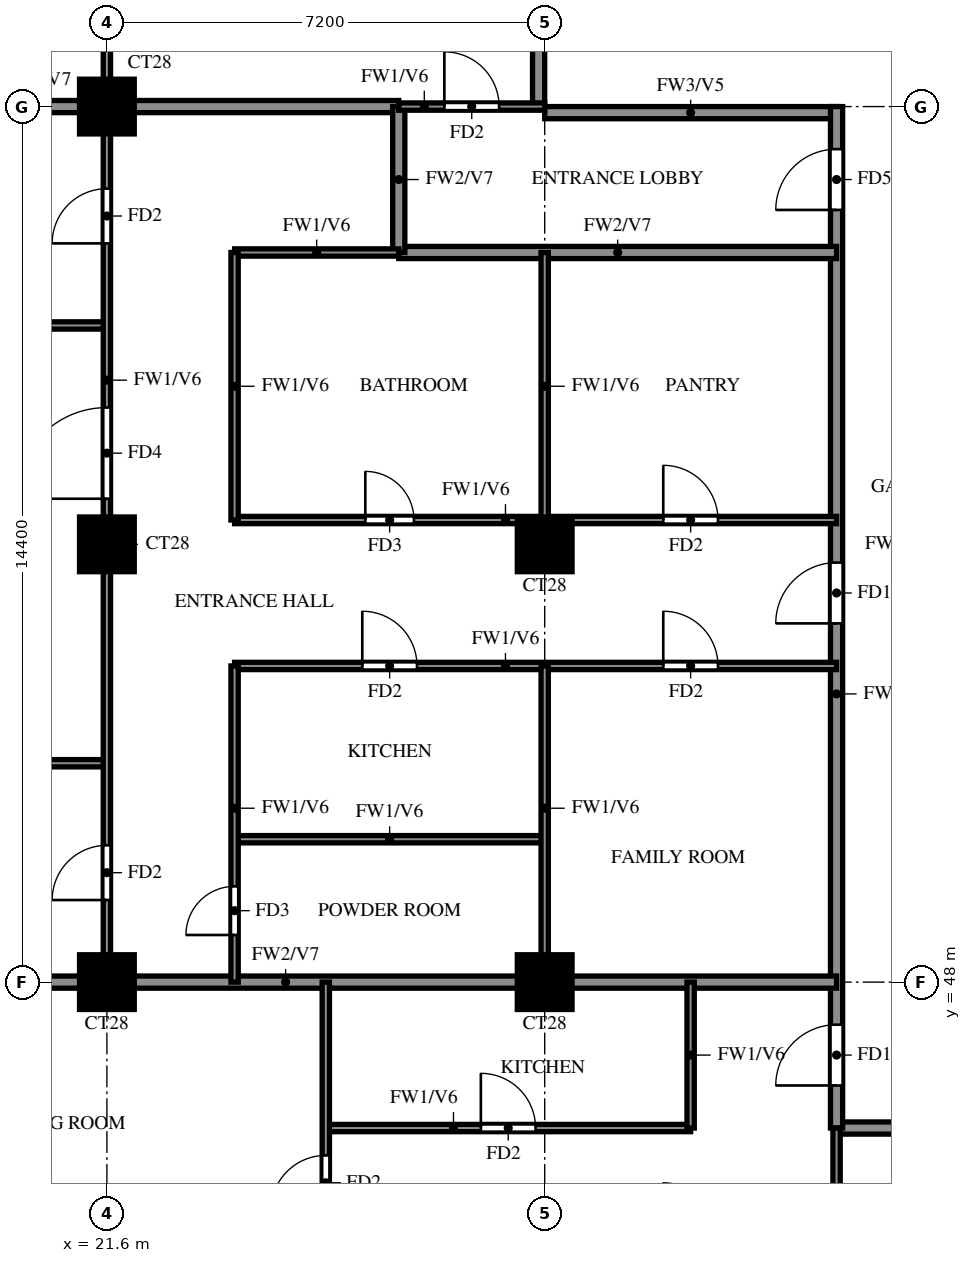
"""IFC4 building model, lengths in metres.
Left out: names, types, materials, properties, quantities, classifications, styles, units other than length and angle.
Written with IfcOpenShell. Run it as: python <this file> out.ifc"""

import sys

from ifc_helpers import new_model, si_unit, direction, frame, frame_2d, origin, origin_2d, place, context, subcontext, project, spatial, rectangle, extrude, source, transform, mapped, element, fill, save


model = new_model("IFC4")
c1 = context("Model", 3, precision=1e-05, world=origin(), true_north=direction((0.0, 1.0)))
c2 = subcontext(c1, "Body", "Model", "MODEL_VIEW")
j1 = project(units=[si_unit("LENGTHUNIT", "METRE"), si_unit("PLANEANGLEUNIT", "RADIAN")], contexts=[c1])
p1 = place(None, origin())
s1 = spatial("IfcSite", under=j1, at=p1, CompositionType="ELEMENT")
p2 = place(p1, origin())
s2 = spatial("IfcBuilding", under=s1, at=p2, CompositionType="ELEMENT")
p3 = place(p2, frame((0.0, 0.0, 202.5)))
s3 = spatial("IfcBuildingStorey", under=s2, at=p3, CompositionType="ELEMENT", Elevation=202.5)
m1 = source(origin(), c2, "Body", "SweptSolid", [
    extrude(rectangle(XDim=0.9, YDim=0.9, at=origin_2d()), origin(), (0.0, 0.0, 1.0), 3.1),
])
for number, where, z_axis, x_axis in (
    (1, (21.6, 48.0, 0.0), (0.0, 0.0, 1.0), (1.0, 0.0, 0.0)),
    (2, (28.8, 48.0, 0.0), (0.0, 0.0, 1.0), (1.0, 0.0, 0.0)),
    (3, (21.6, 55.2, 0.0), (0.0, 0.0, 1.0), (1.0, 0.0, 0.0)),
    (4, (28.8, 55.2, 0.0), (0.0, 0.0, 1.0), (1.0, 0.0, 0.0)),
    (5, (21.6, 62.4, 0.0), (0.0, 0.0, 1.0), (1.0, 0.0, 0.0)),
):
    element("IfcColumn", number, at=place(p3, frame(where, z_axis=z_axis, x_axis=x_axis)), inside=s3, PredefinedType="COLUMN", context=c2, shape_type="MappedRepresentation", body=[
        mapped(m1, transform((0.0, 0.0, 0.0))),
    ])
p4 = place(p3, frame((33.6, 45.6, 0.0), z_axis=(0.0, 0.0, 1.0), x_axis=(1.0, 0.0, 0.0)))
e6 = element("IfcWall", 6, at=p4, inside=s3, PredefinedType="SOLIDWALL", context=c2, shape_type="SweptSolid", body=[
    extrude(rectangle(XDim=7.2, YDim=0.2, at=frame_2d((3.6, 0.0))), origin(), (0.0, 0.0, 1.0), 3.1),
])
p5 = place(p4, frame((3.15, 0.0, 0.0)))
e7 = element("IfcOpeningElement", 7, at=p5, cuts=e6, PredefinedType="OPENING", context=c2, shape_type="SweptSolid", body=[
    extrude(rectangle(XDim=0.9, YDim=2.1, at=frame_2d((0.45, 1.05))), frame((0.0, 0.11, 0.0), z_axis=(0.0, -1.0, 0.0), x_axis=(1.0, 0.0, 0.0)), (0.0, 0.0, 1.0), 0.22),
])
p6 = place(p3, frame((28.8, 62.3, 0.0), z_axis=(0.0, 0.0, 1.0), x_axis=(1.0, 0.0, 0.0)))
e8 = element("IfcWall", 8, at=p6, inside=s3, PredefinedType="SOLIDWALL", context=c2, shape_type="SweptSolid", body=[
    extrude(rectangle(XDim=4.8, YDim=0.2, at=frame_2d((2.4, 0.0))), origin(), (0.0, 0.0, 1.0), 3.1),
])
p7 = place(p3, frame((28.7, 62.4, 0.0), z_axis=(0.0, 0.0, 1.0), x_axis=(0.0, 1.0, 0.0)))
e9 = element("IfcWall", 9, at=p7, inside=s3, PredefinedType="SOLIDWALL", context=c2, shape_type="SweptSolid", body=[
    extrude(rectangle(XDim=15.6, YDim=0.2, at=frame_2d((7.8, 0.0))), origin(), (0.0, 0.0, 1.0), 3.1),
])
p8 = place(p3, frame((33.6, 45.6, 0.0), z_axis=(0.0, 0.0, 1.0), x_axis=(0.0, 1.0, 0.0)))
e10 = element("IfcWall", 10, at=p8, inside=s3, PredefinedType="SOLIDWALL", context=c2, shape_type="SweptSolid", body=[
    extrude(rectangle(XDim=16.8, YDim=0.2, at=frame_2d((8.4, 0.0))), origin(), (0.0, 0.0, 1.0), 3.1),
])
p9 = place(p8, frame((0.7, 0.0, 0.0)))
e11 = element("IfcOpeningElement", 11, at=p9, cuts=e10, PredefinedType="OPENING", context=c2, shape_type="SweptSolid", body=[
    extrude(rectangle(XDim=1.0, YDim=2.1, at=frame_2d((0.5, 1.05))), frame((0.0, 0.11, 0.0), z_axis=(0.0, -1.0, 0.0), x_axis=(1.0, 0.0, 0.0)), (0.0, 0.0, 1.0), 0.22),
])
p10 = place(p8, frame((8.3, 0.0, 0.0)))
e12 = element("IfcOpeningElement", 12, at=p10, cuts=e10, PredefinedType="OPENING", context=c2, shape_type="SweptSolid", body=[
    extrude(rectangle(XDim=1.0, YDim=2.1, at=frame_2d((0.5, 1.05))), frame((0.0, 0.11, 0.0), z_axis=(0.0, -1.0, 0.0), x_axis=(1.0, 0.0, 0.0)), (0.0, 0.0, 1.0), 0.22),
])
p11 = place(p8, frame((15.1, 0.0, 0.0)))
e13 = element("IfcOpeningElement", 13, at=p11, cuts=e10, PredefinedType="OPENING", context=c2, shape_type="SweptSolid", body=[
    extrude(rectangle(XDim=1.0, YDim=2.1, at=frame_2d((0.5, 1.05))), frame((0.0, 0.11, 0.0), z_axis=(0.0, -1.0, 0.0), x_axis=(1.0, 0.0, 0.0)), (0.0, 0.0, 1.0), 0.22),
])
p12 = place(p3, frame((14.525, 48.0, 0.0), z_axis=(0.0, 0.0, 1.0), x_axis=(1.0, 0.0, 0.0)))
e14 = element("IfcWall", 14, at=p12, inside=s3, PredefinedType="SOLIDWALL", context=c2, shape_type="SweptSolid", body=[
    extrude(rectangle(XDim=19.075, YDim=0.2, at=frame_2d((9.538, 0.0))), origin(), (0.0, 0.0, 1.0), 3.1),
])
p13 = place(p3, frame((26.4, 60.0, 0.0), z_axis=(0.0, 0.0, 1.0), x_axis=(1.0, 0.0, 0.0)))
e15 = element("IfcWall", 15, at=p13, inside=s3, PredefinedType="SOLIDWALL", context=c2, shape_type="SweptSolid", body=[
    extrude(rectangle(XDim=7.2, YDim=0.2, at=frame_2d((3.6, 0.0))), origin(), (0.0, 0.0, 1.0), 3.1),
])
p14 = place(p3, frame((14.525, 62.4, 0.0), z_axis=(0.0, 0.0, 1.0), x_axis=(1.0, 0.0, 0.0)))
e16 = element("IfcWall", 16, at=p14, inside=s3, PredefinedType="SOLIDWALL", context=c2, shape_type="SweptSolid", body=[
    extrude(rectangle(XDim=11.875, YDim=0.2, at=frame_2d((5.938, 0.0))), origin(), (0.0, 0.0, 1.0), 3.1),
])
p15 = place(p3, frame((26.4, 60.0, 0.0), z_axis=(0.0, 0.0, 1.0), x_axis=(0.0, 1.0, 0.0)))
e17 = element("IfcWall", 17, at=p15, inside=s3, PredefinedType="SOLIDWALL", context=c2, shape_type="SweptSolid", body=[
    extrude(rectangle(XDim=2.4, YDim=0.2, at=frame_2d((1.2, 0.0))), origin(), (0.0, 0.0, 1.0), 3.1),
])
p16 = place(p3, frame((25.2, 45.6, 0.0), z_axis=(0.0, 0.0, 1.0), x_axis=(1.0, 0.0, 0.0)))
e18 = element("IfcWall", 18, at=p16, inside=s3, PredefinedType="PARTITIONING", context=c2, shape_type="SweptSolid", body=[
    extrude(rectangle(XDim=6.0, YDim=0.12, at=frame_2d((3.0, 0.0))), origin(), (0.0, 0.0, 1.0), 3.1),
])
p17 = place(p16, frame((2.55, 0.0, 0.0)))
e19 = element("IfcOpeningElement", 19, at=p17, cuts=e18, PredefinedType="OPENING", context=c2, shape_type="SweptSolid", body=[
    extrude(rectangle(XDim=0.9, YDim=2.1, at=frame_2d((0.45, 1.05))), frame((0.0, 0.07, 0.0), z_axis=(0.0, -1.0, 0.0), x_axis=(1.0, 0.0, 0.0)), (0.0, 0.0, 1.0), 0.14),
])
p18 = place(p3, frame((23.7, 50.35, 0.0), z_axis=(0.0, 0.0, 1.0), x_axis=(1.0, 0.0, 0.0)))
e20 = element("IfcWall", 20, at=p18, inside=s3, PredefinedType="PARTITIONING", context=c2, shape_type="SweptSolid", body=[
    extrude(rectangle(XDim=5.1, YDim=0.12, at=frame_2d((2.55, 0.0))), origin(), (0.0, 0.0, 1.0), 3.1),
])
p19 = place(p3, frame((14.525, 51.6, 0.0), z_axis=(0.0, 0.0, 1.0), x_axis=(1.0, 0.0, 0.0)))
e21 = element("IfcWall", 21, at=p19, inside=s3, PredefinedType="PARTITIONING", context=c2, shape_type="SweptSolid", body=[
    extrude(rectangle(XDim=7.075, YDim=0.12, at=frame_2d((3.538, 0.0))), origin(), (0.0, 0.0, 1.0), 3.1),
])
p20 = place(p3, frame((23.7, 53.2, 0.0), z_axis=(0.0, 0.0, 1.0), x_axis=(1.0, 0.0, 0.0)))
e22 = element("IfcWall", 22, at=p20, inside=s3, PredefinedType="PARTITIONING", context=c2, shape_type="SweptSolid", body=[
    extrude(rectangle(XDim=9.9, YDim=0.12, at=frame_2d((4.95, 0.0))), origin(), (0.0, 0.0, 1.0), 3.1),
])
p21 = place(p20, frame((2.1, 0.0, 0.0)))
e23 = element("IfcOpeningElement", 23, at=p21, cuts=e22, PredefinedType="OPENING", context=c2, shape_type="SweptSolid", body=[
    extrude(rectangle(XDim=0.9, YDim=2.1, at=frame_2d((0.45, 1.05))), frame((0.0, 0.07, 0.0), z_axis=(0.0, -1.0, 0.0), x_axis=(1.0, 0.0, 0.0)), (0.0, 0.0, 1.0), 0.14),
])
p22 = place(p20, frame((7.05, 0.0, 0.0)))
e24 = element("IfcOpeningElement", 24, at=p22, cuts=e22, PredefinedType="OPENING", context=c2, shape_type="SweptSolid", body=[
    extrude(rectangle(XDim=0.9, YDim=2.1, at=frame_2d((0.45, 1.05))), frame((0.0, 0.07, 0.0), z_axis=(0.0, -1.0, 0.0), x_axis=(1.0, 0.0, 0.0)), (0.0, 0.0, 1.0), 0.14),
])
p23 = place(p3, frame((23.7, 55.6, 0.0), z_axis=(0.0, 0.0, 1.0), x_axis=(1.0, 0.0, 0.0)))
e25 = element("IfcWall", 25, at=p23, inside=s3, PredefinedType="PARTITIONING", context=c2, shape_type="SweptSolid", body=[
    extrude(rectangle(XDim=9.9, YDim=0.12, at=frame_2d((4.95, 0.0))), origin(), (0.0, 0.0, 1.0), 3.1),
])
p24 = place(p23, frame((2.15, 0.0, 0.0)))
e26 = element("IfcOpeningElement", 26, at=p24, cuts=e25, PredefinedType="OPENING", context=c2, shape_type="SweptSolid", body=[
    extrude(rectangle(XDim=0.8, YDim=2.1, at=frame_2d((0.4, 1.05))), frame((0.0, 0.07, 0.0), z_axis=(0.0, -1.0, 0.0), x_axis=(1.0, 0.0, 0.0)), (0.0, 0.0, 1.0), 0.14),
])
p25 = place(p23, frame((7.05, 0.0, 0.0)))
e27 = element("IfcOpeningElement", 27, at=p25, cuts=e25, PredefinedType="OPENING", context=c2, shape_type="SweptSolid", body=[
    extrude(rectangle(XDim=0.9, YDim=2.1, at=frame_2d((0.45, 1.05))), frame((0.0, 0.07, 0.0), z_axis=(0.0, -1.0, 0.0), x_axis=(1.0, 0.0, 0.0)), (0.0, 0.0, 1.0), 0.14),
])
p26 = place(p3, frame((14.525, 58.8, 0.0), z_axis=(0.0, 0.0, 1.0), x_axis=(1.0, 0.0, 0.0)))
e28 = element("IfcWall", 28, at=p26, inside=s3, PredefinedType="PARTITIONING", context=c2, shape_type="SweptSolid", body=[
    extrude(rectangle(XDim=7.075, YDim=0.12, at=frame_2d((3.538, 0.0))), origin(), (0.0, 0.0, 1.0), 3.1),
])
p27 = place(p3, frame((23.7, 60.0, 0.0), z_axis=(0.0, 0.0, 1.0), x_axis=(1.0, 0.0, 0.0)))
e29 = element("IfcWall", 29, at=p27, inside=s3, PredefinedType="PARTITIONING", context=c2, shape_type="SweptSolid", body=[
    extrude(rectangle(XDim=2.7, YDim=0.12, at=frame_2d((1.35, 0.0))), origin(), (0.0, 0.0, 1.0), 3.1),
])
p28 = place(p3, frame((26.4, 62.4, 0.0), z_axis=(0.0, 0.0, 1.0), x_axis=(1.0, 0.0, 0.0)))
e30 = element("IfcWall", 30, at=p28, inside=s3, PredefinedType="PARTITIONING", context=c2, shape_type="SweptSolid", body=[
    extrude(rectangle(XDim=2.4, YDim=0.12, at=frame_2d((1.2, 0.0))), origin(), (0.0, 0.0, 1.0), 3.1),
])
p29 = place(p28, frame((0.75, 0.0, 0.0)))
e31 = element("IfcOpeningElement", 31, at=p29, cuts=e30, PredefinedType="OPENING", context=c2, shape_type="SweptSolid", body=[
    extrude(rectangle(XDim=0.9, YDim=2.1, at=frame_2d((0.45, 1.05))), frame((0.0, 0.07, 0.0), z_axis=(0.0, -1.0, 0.0), x_axis=(1.0, 0.0, 0.0)), (0.0, 0.0, 1.0), 0.14),
])
p30 = place(p3, frame((21.6, 48.0, 0.0), z_axis=(0.0, 0.0, 1.0), x_axis=(0.0, 1.0, 0.0)))
e32 = element("IfcWall", 32, at=p30, inside=s3, PredefinedType="PARTITIONING", context=c2, shape_type="SweptSolid", body=[
    extrude(rectangle(XDim=18.0, YDim=0.12, at=frame_2d((9.0, 0.0))), origin(), (0.0, 0.0, 1.0), 3.1),
])
p31 = place(p30, frame((1.35, 0.0, 0.0)))
e33 = element("IfcOpeningElement", 33, at=p31, cuts=e32, PredefinedType="OPENING", context=c2, shape_type="SweptSolid", body=[
    extrude(rectangle(XDim=0.9, YDim=2.1, at=frame_2d((0.45, 1.05))), frame((0.0, 0.07, 0.0), z_axis=(0.0, -1.0, 0.0), x_axis=(1.0, 0.0, 0.0)), (0.0, 0.0, 1.0), 0.14),
])
p32 = place(p30, frame((7.95, 0.0, 0.0)))
e34 = element("IfcOpeningElement", 34, at=p32, cuts=e32, PredefinedType="OPENING", context=c2, shape_type="SweptSolid", body=[
    extrude(rectangle(XDim=1.5, YDim=2.1, at=frame_2d((0.75, 1.05))), frame((0.0, 0.07, 0.0), z_axis=(0.0, -1.0, 0.0), x_axis=(1.0, 0.0, 0.0)), (0.0, 0.0, 1.0), 0.14),
])
p33 = place(p30, frame((12.15, 0.0, 0.0)))
e35 = element("IfcOpeningElement", 35, at=p33, cuts=e32, PredefinedType="OPENING", context=c2, shape_type="SweptSolid", body=[
    extrude(rectangle(XDim=0.9, YDim=2.1, at=frame_2d((0.45, 1.05))), frame((0.0, 0.07, 0.0), z_axis=(0.0, -1.0, 0.0), x_axis=(1.0, 0.0, 0.0)), (0.0, 0.0, 1.0), 0.14),
])
p34 = place(p30, frame((15.75, 0.0, 0.0)))
e36 = element("IfcOpeningElement", 36, at=p34, cuts=e32, PredefinedType="OPENING", context=c2, shape_type="SweptSolid", body=[
    extrude(rectangle(XDim=0.9, YDim=2.1, at=frame_2d((0.45, 1.05))), frame((0.0, 0.07, 0.0), z_axis=(0.0, -1.0, 0.0), x_axis=(1.0, 0.0, 0.0)), (0.0, 0.0, 1.0), 0.14),
])
p35 = place(p3, frame((23.7, 48.0, 0.0), z_axis=(0.0, 0.0, 1.0), x_axis=(0.0, 1.0, 0.0)))
e37 = element("IfcWall", 37, at=p35, inside=s3, PredefinedType="PARTITIONING", context=c2, shape_type="SweptSolid", body=[
    extrude(rectangle(XDim=5.2, YDim=0.12, at=frame_2d((2.6, 0.0))), origin(), (0.0, 0.0, 1.0), 3.1),
])
p36 = place(p35, frame((0.775, 0.0, 0.0)))
e38 = element("IfcOpeningElement", 38, at=p36, cuts=e37, PredefinedType="OPENING", context=c2, shape_type="SweptSolid", body=[
    extrude(rectangle(XDim=0.8, YDim=2.1, at=frame_2d((0.4, 1.05))), frame((0.0, 0.07, 0.0), z_axis=(0.0, -1.0, 0.0), x_axis=(1.0, 0.0, 0.0)), (0.0, 0.0, 1.0), 0.14),
])
p37 = place(p3, frame((23.7, 55.6, 0.0), z_axis=(0.0, 0.0, 1.0), x_axis=(0.0, 1.0, 0.0)))
e39 = element("IfcWall", 39, at=p37, inside=s3, PredefinedType="PARTITIONING", context=c2, shape_type="SweptSolid", body=[
    extrude(rectangle(XDim=4.4, YDim=0.12, at=frame_2d((2.2, 0.0))), origin(), (0.0, 0.0, 1.0), 3.1),
])
p38 = place(p3, frame((25.2, 39.725, 0.0), z_axis=(0.0, 0.0, 1.0), x_axis=(0.0, 1.0, 0.0)))
e40 = element("IfcWall", 40, at=p38, inside=s3, PredefinedType="PARTITIONING", context=c2, shape_type="SweptSolid", body=[
    extrude(rectangle(XDim=8.275, YDim=0.12, at=frame_2d((4.137, 0.0))), origin(), (0.0, 0.0, 1.0), 3.1),
])
p39 = place(p38, frame((4.525, 0.0, 0.0)))
e41 = element("IfcOpeningElement", 41, at=p39, cuts=e40, PredefinedType="OPENING", context=c2, shape_type="SweptSolid", body=[
    extrude(rectangle(XDim=0.9, YDim=2.1, at=frame_2d((0.45, 1.05))), frame((0.0, 0.07, 0.0), z_axis=(0.0, -1.0, 0.0), x_axis=(1.0, 0.0, 0.0)), (0.0, 0.0, 1.0), 0.14),
])
p40 = place(p3, frame((28.8, 48.0, 0.0), z_axis=(0.0, 0.0, 1.0), x_axis=(0.0, 1.0, 0.0)))
e42 = element("IfcWall", 42, at=p40, inside=s3, PredefinedType="PARTITIONING", context=c2, shape_type="SweptSolid", body=[
    extrude(rectangle(XDim=5.2, YDim=0.12, at=frame_2d((2.6, 0.0))), origin(), (0.0, 0.0, 1.0), 3.1),
])
p41 = place(p3, frame((28.8, 55.6, 0.0), z_axis=(0.0, 0.0, 1.0), x_axis=(0.0, 1.0, 0.0)))
e43 = element("IfcWall", 43, at=p41, inside=s3, PredefinedType="PARTITIONING", context=c2, shape_type="SweptSolid", body=[
    extrude(rectangle(XDim=4.4, YDim=0.12, at=frame_2d((2.2, 0.0))), origin(), (0.0, 0.0, 1.0), 3.1),
])
p42 = place(p3, frame((31.2, 45.6, 0.0), z_axis=(0.0, 0.0, 1.0), x_axis=(0.0, 1.0, 0.0)))
e44 = element("IfcWall", 44, at=p42, inside=s3, PredefinedType="PARTITIONING", context=c2, shape_type="SweptSolid", body=[
    extrude(rectangle(XDim=2.4, YDim=0.12, at=frame_2d((1.2, 0.0))), origin(), (0.0, 0.0, 1.0), 3.1),
])
p43 = place(p3, frame((33.6, 39.725, 0.0), z_axis=(0.0, 0.0, 1.0), x_axis=(0.0, 1.0, 0.0)))
e45 = element("IfcWall", 45, at=p43, inside=s3, PredefinedType="PARTITIONING", context=c2, shape_type="SweptSolid", body=[
    extrude(rectangle(XDim=5.875, YDim=0.12, at=frame_2d((2.938, 0.0))), origin(), (0.0, 0.0, 1.0), 3.1),
])
p44 = place(p9, origin())
e46 = element("IfcDoor", 46, at=p44, inside=s3, OperationType="SINGLE_SWING_RIGHT", PredefinedType="DOOR", context=c2, shape_type="SweptSolid", body=[
    extrude(rectangle(XDim=1.0, YDim=2.1, at=frame_2d((0.5, 1.05))), frame((0.0, 0.025, 0.0), z_axis=(0.0, -1.0, 0.0), x_axis=(1.0, 0.0, 0.0)), (0.0, 0.0, 1.0), 0.05),
])
fill(e11, e46)
p45 = place(p39, origin())
e47 = element("IfcDoor", 47, at=p45, inside=s3, OperationType="SINGLE_SWING_LEFT", PredefinedType="DOOR", context=c2, shape_type="SweptSolid", body=[
    extrude(rectangle(XDim=0.9, YDim=2.1, at=frame_2d((0.45, 1.05))), frame((0.0, 0.025, 0.0), z_axis=(0.0, -1.0, 0.0), x_axis=(1.0, 0.0, 0.0)), (0.0, 0.0, 1.0), 0.05),
])
fill(e41, e47)
p46 = place(p17, origin())
e48 = element("IfcDoor", 48, at=p46, inside=s3, OperationType="SINGLE_SWING_LEFT", PredefinedType="DOOR", context=c2, shape_type="SweptSolid", body=[
    extrude(rectangle(XDim=0.9, YDim=2.1, at=frame_2d((0.45, 1.05))), frame((0.0, 0.025, 0.0), z_axis=(0.0, -1.0, 0.0), x_axis=(1.0, 0.0, 0.0)), (0.0, 0.0, 1.0), 0.05),
])
fill(e19, e48)
p47 = place(p10, origin())
e49 = element("IfcDoor", 49, at=p47, inside=s3, OperationType="SINGLE_SWING_RIGHT", PredefinedType="DOOR", context=c2, shape_type="SweptSolid", body=[
    extrude(rectangle(XDim=1.0, YDim=2.1, at=frame_2d((0.5, 1.05))), frame((0.0, 0.025, 0.0), z_axis=(0.0, -1.0, 0.0), x_axis=(1.0, 0.0, 0.0)), (0.0, 0.0, 1.0), 0.05),
])
fill(e12, e49)
p48 = place(p31, origin())
e50 = element("IfcDoor", 50, at=p48, inside=s3, OperationType="SINGLE_SWING_LEFT", PredefinedType="DOOR", context=c2, shape_type="SweptSolid", body=[
    extrude(rectangle(XDim=0.9, YDim=2.1, at=frame_2d((0.45, 1.05))), frame((0.0, 0.025, 0.0), z_axis=(0.0, -1.0, 0.0), x_axis=(1.0, 0.0, 0.0)), (0.0, 0.0, 1.0), 0.05),
])
fill(e33, e50)
p49 = place(p32, origin())
e51 = element("IfcDoor", 51, at=p49, inside=s3, OperationType="SINGLE_SWING_RIGHT", PredefinedType="DOOR", context=c2, shape_type="SweptSolid", body=[
    extrude(rectangle(XDim=1.5, YDim=2.1, at=frame_2d((0.75, 1.05))), frame((0.0, 0.025, 0.0), z_axis=(0.0, -1.0, 0.0), x_axis=(1.0, 0.0, 0.0)), (0.0, 0.0, 1.0), 0.05),
])
fill(e34, e51)
p50 = place(p33, origin())
e52 = element("IfcDoor", 52, at=p50, inside=s3, OperationType="SINGLE_SWING_RIGHT", PredefinedType="DOOR", context=c2, shape_type="SweptSolid", body=[
    extrude(rectangle(XDim=0.9, YDim=2.1, at=frame_2d((0.45, 1.05))), frame((0.0, 0.025, 0.0), z_axis=(0.0, -1.0, 0.0), x_axis=(1.0, 0.0, 0.0)), (0.0, 0.0, 1.0), 0.05),
])
fill(e35, e52)
p51 = place(p36, origin())
e53 = element("IfcDoor", 53, at=p51, inside=s3, OperationType="SINGLE_SWING_LEFT", PredefinedType="DOOR", context=c2, shape_type="SweptSolid", body=[
    extrude(rectangle(XDim=0.8, YDim=2.1, at=frame_2d((0.4, 1.05))), frame((0.0, 0.025, 0.0), z_axis=(0.0, -1.0, 0.0), x_axis=(1.0, 0.0, 0.0)), (0.0, 0.0, 1.0), 0.05),
])
fill(e38, e53)
p52 = place(p21, origin())
e54 = element("IfcDoor", 54, at=p52, inside=s3, OperationType="SINGLE_SWING_LEFT", PredefinedType="DOOR", context=c2, shape_type="SweptSolid", body=[
    extrude(rectangle(XDim=0.9, YDim=2.1, at=frame_2d((0.45, 1.05))), frame((0.0, 0.025, 0.0), z_axis=(0.0, -1.0, 0.0), x_axis=(1.0, 0.0, 0.0)), (0.0, 0.0, 1.0), 0.05),
])
fill(e23, e54)
p53 = place(p24, origin())
e55 = element("IfcDoor", 55, at=p53, inside=s3, OperationType="SINGLE_SWING_RIGHT", PredefinedType="DOOR", context=c2, shape_type="SweptSolid", body=[
    extrude(rectangle(XDim=0.8, YDim=2.1, at=frame_2d((0.4, 1.05))), frame((0.0, 0.025, 0.0), z_axis=(0.0, -1.0, 0.0), x_axis=(1.0, 0.0, 0.0)), (0.0, 0.0, 1.0), 0.05),
])
fill(e26, e55)
p54 = place(p22, origin())
e56 = element("IfcDoor", 56, at=p54, inside=s3, OperationType="SINGLE_SWING_LEFT", PredefinedType="DOOR", context=c2, shape_type="SweptSolid", body=[
    extrude(rectangle(XDim=0.9, YDim=2.1, at=frame_2d((0.45, 1.05))), frame((0.0, 0.025, 0.0), z_axis=(0.0, -1.0, 0.0), x_axis=(1.0, 0.0, 0.0)), (0.0, 0.0, 1.0), 0.05),
])
fill(e24, e56)
p55 = place(p25, origin())
e57 = element("IfcDoor", 57, at=p55, inside=s3, OperationType="SINGLE_SWING_LEFT", PredefinedType="DOOR", context=c2, shape_type="SweptSolid", body=[
    extrude(rectangle(XDim=0.9, YDim=2.1, at=frame_2d((0.45, 1.05))), frame((0.0, 0.025, 0.0), z_axis=(0.0, -1.0, 0.0), x_axis=(1.0, 0.0, 0.0)), (0.0, 0.0, 1.0), 0.05),
])
fill(e27, e57)
p56 = place(p29, origin())
e58 = element("IfcDoor", 58, at=p56, inside=s3, OperationType="SINGLE_SWING_LEFT", PredefinedType="DOOR", context=c2, shape_type="SweptSolid", body=[
    extrude(rectangle(XDim=0.9, YDim=2.1, at=frame_2d((0.45, 1.05))), frame((0.0, 0.025, 0.0), z_axis=(0.0, -1.0, 0.0), x_axis=(1.0, 0.0, 0.0)), (0.0, 0.0, 1.0), 0.05),
])
fill(e31, e58)
p57 = place(p11, origin())
e59 = element("IfcDoor", 59, at=p57, inside=s3, OperationType="SINGLE_SWING_RIGHT", PredefinedType="DOOR", context=c2, shape_type="SweptSolid", body=[
    extrude(rectangle(XDim=1.0, YDim=2.1, at=frame_2d((0.5, 1.05))), frame((0.0, 0.025, 0.0), z_axis=(0.0, -1.0, 0.0), x_axis=(1.0, 0.0, 0.0)), (0.0, 0.0, 1.0), 0.05),
])
fill(e13, e59)
save(model, sys.argv[1])
